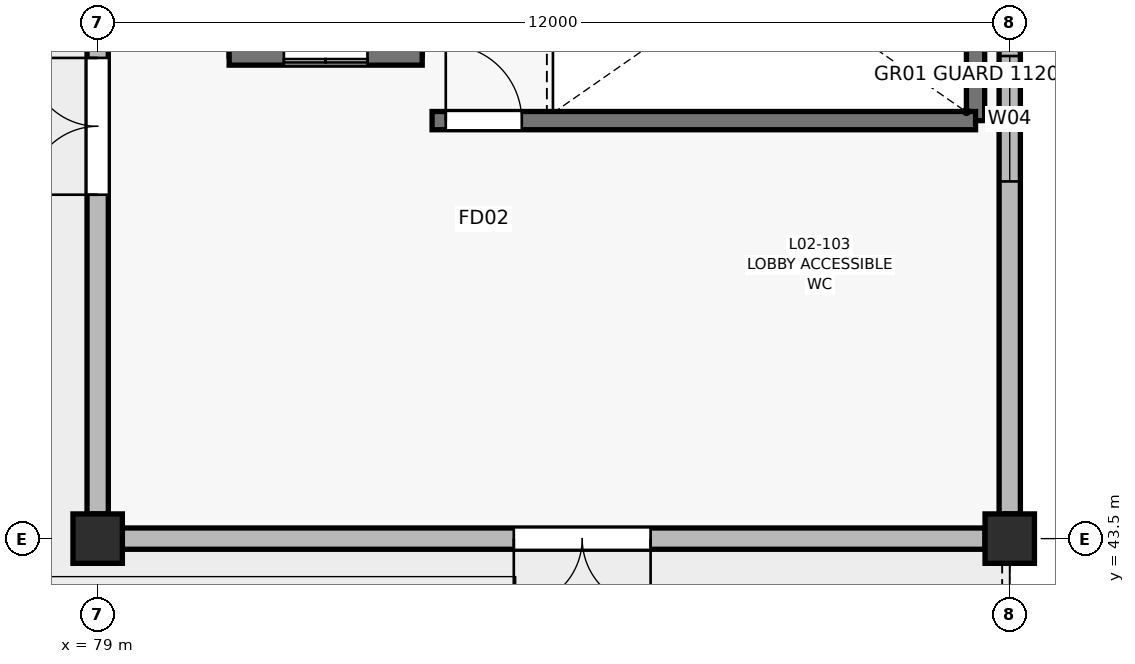
"""IFC4 building model, lengths in metres.
Left out: names, types, materials, properties, quantities, classifications, styles, units other than length and angle.
Written with IfcOpenShell. Run it as: python <this file> out.ifc"""

import sys

from ifc_helpers import new_model, si_unit, direction, frame, frame_2d, origin, origin_2d, place, context, subcontext, project, spatial, rectangle, extrude, element, fill, save


model = new_model("IFC4")
c1 = context("Model", 3, precision=1e-05, world=origin(), true_north=direction((0.0, 1.0)))
c2 = subcontext(c1, "Body", "Model", "MODEL_VIEW")
j1 = project(units=[si_unit("LENGTHUNIT", "METRE"), si_unit("PLANEANGLEUNIT", "RADIAN")], contexts=[c1])
p1 = place(None, origin())
s1 = spatial("IfcSite", under=j1, at=p1, CompositionType="ELEMENT")
p2 = place(p1, origin())
s2 = spatial("IfcBuilding", under=s1, at=p2, CompositionType="ELEMENT")
p3 = place(p2, frame((0.0, 0.0, 9.0)))
s3 = spatial("IfcBuildingStorey", under=s2, at=p3, CompositionType="ELEMENT", Elevation=9.0)
for number, where, z_axis, x_axis in (
    (1, (79.0, 43.5, 0.0), (0.0, 0.0, 1.0), (1.0, 0.0, 0.0)),
    (2, (91.0, 43.5, 0.0), (0.0, 0.0, 1.0), (1.0, 0.0, 0.0)),
):
    element("IfcColumn", number, at=place(p3, frame(where, z_axis=z_axis, x_axis=x_axis)), inside=s3, PredefinedType="COLUMN", context=c2, shape_type="SweptSolid", body=[
        extrude(rectangle(XDim=0.65, YDim=0.65, at=origin_2d()), origin(), (0.0, 0.0, 1.0), 4.2),
    ])
p4 = place(p3, frame((79.0, 43.825, 0.0), z_axis=(0.0, 0.0, 1.0), x_axis=(0.0, 1.0, 0.0)))
e3 = element("IfcWall", 3, at=p4, inside=s3, PredefinedType="SOLIDWALL", context=c2, shape_type="SweptSolid", body=[
    extrude(rectangle(XDim=9.225, YDim=0.28, at=frame_2d((4.613, 0.0))), origin(), (0.0, 0.0, 1.0), 3.1),
])
p5 = place(p4, frame((4.2, 0.0, 0.0)))
e4 = element("IfcOpeningElement", 4, at=p5, cuts=e3, PredefinedType="OPENING", context=c2, shape_type="SweptSolid", body=[
    extrude(rectangle(XDim=1.8, YDim=2.25, at=frame_2d((0.9, 1.125))), frame((0.0, 0.15, 0.0), z_axis=(0.0, -1.0, 0.0), x_axis=(1.0, 0.0, 0.0)), (0.0, 0.0, 1.0), 0.3),
])
p6 = place(p3, frame((91.0, 53.05, 0.0), z_axis=(0.0, 0.0, 1.0), x_axis=(0.0, -1.0, 0.0)))
e5 = element("IfcWall", 5, at=p6, inside=s3, PredefinedType="SOLIDWALL", context=c2, shape_type="SweptSolid", body=[
    extrude(rectangle(XDim=9.225, YDim=0.28, at=frame_2d((4.613, 0.0))), origin(), (0.0, 0.0, 1.0), 3.1),
])
p7 = place(p6, frame((3.2, 0.0, 0.9)))
e6 = element("IfcOpeningElement", 6, at=p7, cuts=e5, PredefinedType="OPENING", context=c2, shape_type="SweptSolid", body=[
    extrude(rectangle(XDim=1.65, YDim=1.5, at=frame_2d((0.825, 0.75))), frame((0.0, 0.15, 0.0), z_axis=(0.0, -1.0, 0.0), x_axis=(1.0, 0.0, 0.0)), (0.0, 0.0, 1.0), 0.3),
])
p8 = place(p3, frame((90.675, 43.5, 0.0), z_axis=(0.0, 0.0, 1.0), x_axis=(-1.0, 0.0, 0.0)))
e7 = element("IfcWall", 7, at=p8, inside=s3, PredefinedType="SOLIDWALL", context=c2, shape_type="SweptSolid", body=[
    extrude(rectangle(XDim=11.35, YDim=0.28, at=frame_2d((5.675, 0.0))), origin(), (0.0, 0.0, 1.0), 3.1),
])
p9 = place(p8, frame((4.4, 0.0, 0.0)))
e8 = element("IfcOpeningElement", 8, at=p9, cuts=e7, PredefinedType="OPENING", context=c2, shape_type="SweptSolid", body=[
    extrude(rectangle(XDim=1.8, YDim=2.25, at=frame_2d((0.9, 1.125))), frame((0.0, 0.15, 0.0), z_axis=(0.0, -1.0, 0.0), x_axis=(1.0, 0.0, 0.0)), (0.0, 0.0, 1.0), 0.3),
])
for number, where, z_axis, x_axis in (
    (9, (80.85, 49.85, 0.0), (0.0, 0.0, 1.0), (0.0, 1.0, 0.0)),
    (10, (83.15, 52.55, 0.0), (0.0, 0.0, 1.0), (0.0, -1.0, 0.0)),
):
    element("IfcWall", number, at=place(p3, frame(where, z_axis=z_axis, x_axis=x_axis)), inside=s3, PredefinedType="SHEAR", context=c2, shape_type="SweptSolid", body=[
        extrude(rectangle(XDim=2.7, YDim=0.24, at=frame_2d((1.35, 0.0))), origin(), (0.0, 0.0, 1.0), 3.98),
    ])
p10 = place(p3, frame((83.27, 49.85, 0.0), z_axis=(0.0, 0.0, 1.0), x_axis=(-1.0, 0.0, 0.0)))
e11 = element("IfcWall", 11, at=p10, inside=s3, PredefinedType="SHEAR", context=c2, shape_type="SweptSolid", body=[
    extrude(rectangle(XDim=2.54, YDim=0.24, at=frame_2d((1.27, 0.0))), origin(), (0.0, 0.0, 1.0), 3.98),
])
p11 = place(p10, frame((0.72, 0.0, 0.0)))
e12 = element("IfcOpeningElement", 12, at=p11, cuts=e11, PredefinedType="OPENING", context=c2, shape_type="SweptSolid", body=[
    extrude(rectangle(XDim=1.1, YDim=2.15, at=frame_2d((0.55, 1.075))), frame((0.0, 0.13, 0.0), z_axis=(0.0, -1.0, 0.0), x_axis=(1.0, 0.0, 0.0)), (0.0, 0.0, 1.0), 0.26),
])
p12 = place(p3, frame((90.55, 49.0, 0.0), z_axis=(0.0, 0.0, 1.0), x_axis=(0.0, 1.0, 0.0)))
e13 = element("IfcWall", 13, at=p12, inside=s3, PredefinedType="SHEAR", context=c2, shape_type="SweptSolid", body=[
    extrude(rectangle(XDim=4.0, YDim=0.24, at=frame_2d((2.0, 0.0))), origin(), (0.0, 0.0, 1.0), 3.98),
])
p13 = place(p3, frame((83.4, 49.0, 0.0), z_axis=(0.0, 0.0, 1.0), x_axis=(1.0, 0.0, 0.0)))
e14 = element("IfcWall", 14, at=p13, inside=s3, PredefinedType="SHEAR", context=c2, shape_type="SweptSolid", body=[
    extrude(rectangle(XDim=7.15, YDim=0.24, at=frame_2d((3.575, 0.0))), origin(), (0.0, 0.0, 1.0), 3.98),
])
p14 = place(p13, frame((0.18, 0.0, 0.0)))
e15 = element("IfcOpeningElement", 15, at=p14, cuts=e14, PredefinedType="OPENING", context=c2, shape_type="SweptSolid", body=[
    extrude(rectangle(XDim=1.0, YDim=2.15, at=frame_2d((0.5, 1.075))), frame((0.0, 0.13, 0.0), z_axis=(0.0, -1.0, 0.0), x_axis=(1.0, 0.0, 0.0)), (0.0, 0.0, 1.0), 0.26),
])
p15 = place(p5, origin())
e16 = element("IfcDoor", 16, at=p15, inside=s3, OperationType="DOUBLE_DOOR_SINGLE_SWING", PredefinedType="DOOR", context=c2, shape_type="SweptSolid", body=[
    extrude(rectangle(XDim=1.8, YDim=2.25, at=frame_2d((0.9, 1.125))), frame((0.0, 0.025, 0.0), z_axis=(0.0, -1.0, 0.0), x_axis=(1.0, 0.0, 0.0)), (0.0, 0.0, 1.0), 0.05),
])
fill(e4, e16)
p16 = place(p7, origin())
e17 = element("IfcWindow", 17, at=p16, inside=s3, PartitioningType="SINGLE_PANEL", PredefinedType="WINDOW", context=c2, shape_type="SweptSolid", body=[
    extrude(rectangle(XDim=1.65, YDim=1.5, at=frame_2d((0.825, 0.75))), frame((0.0, 0.03, 0.0), z_axis=(0.0, -1.0, 0.0), x_axis=(1.0, 0.0, 0.0)), (0.0, 0.0, 1.0), 0.06),
])
fill(e6, e17)
p17 = place(p9, origin())
e18 = element("IfcDoor", 18, at=p17, inside=s3, OperationType="DOUBLE_DOOR_SINGLE_SWING", PredefinedType="DOOR", context=c2, shape_type="SweptSolid", body=[
    extrude(rectangle(XDim=1.8, YDim=2.25, at=frame_2d((0.9, 1.125))), frame((0.0, 0.025, 0.0), z_axis=(0.0, -1.0, 0.0), x_axis=(1.0, 0.0, 0.0)), (0.0, 0.0, 1.0), 0.05),
])
fill(e8, e18)
p18 = place(p11, origin())
e19 = element("IfcDoor", 19, at=p18, inside=s3, OperationType="DOUBLE_DOOR_SLIDING", PredefinedType="USERDEFINED", context=c2, shape_type="SweptSolid", body=[
    extrude(rectangle(XDim=1.1, YDim=2.15, at=frame_2d((0.55, 1.075))), frame((0.0, 0.025, 0.0), z_axis=(0.0, -1.0, 0.0), x_axis=(1.0, 0.0, 0.0)), (0.0, 0.0, 1.0), 0.05),
])
fill(e12, e19)
p19 = place(p14, origin())
e20 = element("IfcDoor", 20, at=p19, inside=s3, OperationType="SINGLE_SWING_LEFT", PredefinedType="DOOR", context=c2, shape_type="SweptSolid", body=[
    extrude(rectangle(XDim=1.0, YDim=2.15, at=frame_2d((0.5, 1.075))), frame((0.0, 0.025, 0.0), z_axis=(0.0, -1.0, 0.0), x_axis=(1.0, 0.0, 0.0)), (0.0, 0.0, 1.0), 0.05),
])
fill(e15, e20)
save(model, sys.argv[1])
